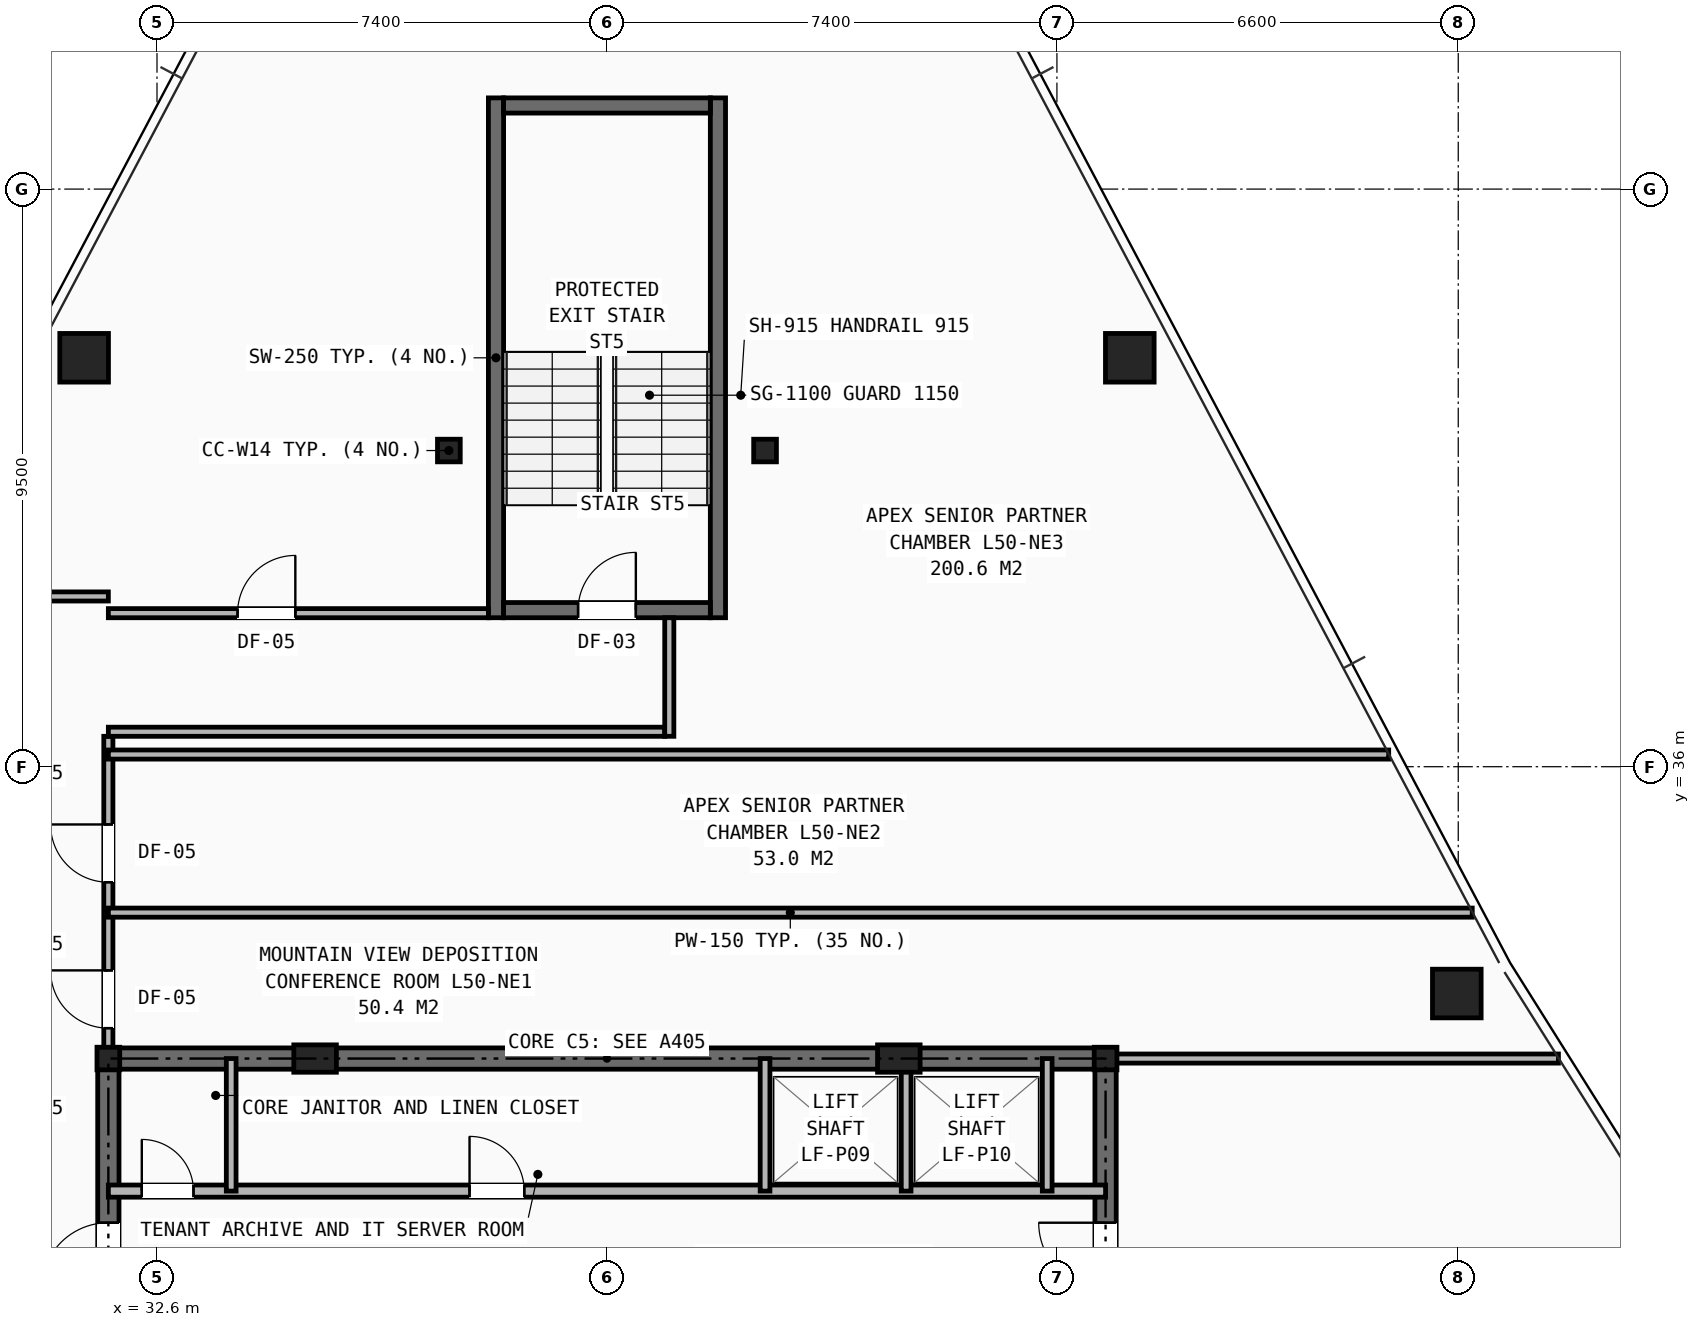
"""IFC4 building model, lengths in metres.
Left out: names, types, materials, properties, quantities, classifications, styles, units other than length and angle.
Written with IfcOpenShell. Run it as: python <this file> out.ifc"""

import sys

from ifc_helpers import new_model, si_unit, direction, frame, frame_2d, origin, origin_2d, place, context, subcontext, project, spatial, rectangle, hollow_rectangle, i_section, extrude, element, fill, save


model = new_model("IFC4")
c1 = context("Model", 3, precision=1e-05, world=origin(), true_north=direction((0.0, 1.0)))
c2 = subcontext(c1, "Body", "Model", "MODEL_VIEW")
j1 = project(units=[si_unit("LENGTHUNIT", "METRE"), si_unit("PLANEANGLEUNIT", "RADIAN")], contexts=[c1])
p1 = place(None, origin())
s1 = spatial("IfcSite", under=j1, at=p1, CompositionType="ELEMENT")
p2 = place(p1, origin())
s2 = spatial("IfcBuilding", under=s1, at=p2, CompositionType="ELEMENT")
p3 = place(p2, frame((0.0, 0.0, 175.8)))
s3 = spatial("IfcBuildingStorey", under=s2, at=p3, CompositionType="ELEMENT", Elevation=175.8)
for number, where, z_axis, x_axis in (
    (1, (31.8, 31.2, 0.0), (0.0, 0.0, 1.0), (1.0, 0.0, 0.0)),
    (2, (48.2, 31.2, 0.0), (0.0, 0.0, 1.0), (1.0, 0.0, 0.0)),
    (3, (37.4, 41.2, 0.0), (0.0, 0.0, 1.0), (1.0, 0.0, 0.0)),
    (4, (42.6, 41.2, 0.0), (0.0, 0.0, 1.0), (1.0, 0.0, 0.0)),
):
    element("IfcColumn", number, at=place(p3, frame(where, z_axis=z_axis, x_axis=x_axis)), inside=s3, PredefinedType="COLUMN", context=c2, shape_type="SweptSolid", body=[
        extrude(i_section(OverallWidth=0.374, OverallDepth=0.372, WebThickness=0.016, FlangeThickness=0.026, at=origin_2d()), origin(), (0.0, 0.0, 1.0), 3.45),
    ])
for number, where, z_axis, x_axis in (
    (5, (35.2, 31.2, 0.0), (0.0, 0.0, 1.0), (1.0, 0.0, 0.0)),
    (6, (44.8, 31.2, 0.0), (0.0, 0.0, 1.0), (1.0, 0.0, 0.0)),
):
    element("IfcColumn", number, at=place(p3, frame(where, z_axis=z_axis, x_axis=x_axis)), inside=s3, PredefinedType="PILASTER", context=c2, shape_type="SweptSolid", body=[
        extrude(rectangle(XDim=0.7, YDim=0.45, at=origin_2d()), origin(), (0.0, 0.0, 1.0), 3.45),
    ])
for number, where, z_axis, x_axis in (
    (7, (31.402, 42.726, 0.0), (0.0, 0.0, 1.0), (1.0, 0.0, 0.0)),
    (8, (53.976, 32.269, 0.0), (0.0, 0.0, 1.0), (1.0, 0.0, 0.0)),
    (9, (48.598, 42.726, 0.0), (0.0, 0.0, 1.0), (1.0, 0.0, 0.0)),
):
    element("IfcColumn", number, at=place(p3, frame(where, z_axis=z_axis, x_axis=x_axis)), inside=s3, PredefinedType="COLUMN", context=c2, shape_type="SweptSolid", body=[
        extrude(hollow_rectangle(XDim=0.8, YDim=0.8, WallThickness=0.055, at=origin_2d()), origin(), (0.0, 0.0, 1.0), 3.45),
    ])
p4 = place(p3, frame((31.8, 31.2, 0.0), z_axis=(0.0, 0.0, 1.0), x_axis=(1.0, 0.0, 0.0)))
e10 = element("IfcWall", 10, at=p4, inside=s3, PredefinedType="SHEAR", context=c2, shape_type="SweptSolid", body=[
    extrude(rectangle(XDim=16.4, YDim=0.35, at=frame_2d((8.2, 0.0))), origin(), (0.0, 0.0, 1.0), 3.21),
])
p5 = place(p3, frame((31.8, 16.4, 0.0), z_axis=(0.0, 0.0, 1.0), x_axis=(0.0, 1.0, 0.0)))
e11 = element("IfcWall", 11, at=p5, inside=s3, PredefinedType="SHEAR", context=c2, shape_type="SweptSolid", body=[
    extrude(rectangle(XDim=14.8, YDim=0.35, at=frame_2d((7.4, 0.0))), origin(), (0.0, 0.0, 1.0), 3.21),
])
p6 = place(p5, frame((11.0, 0.0, 0.0)))
e12 = element("IfcOpeningElement", 12, at=p6, cuts=e11, PredefinedType="OPENING", context=c2, shape_type="SweptSolid", body=[
    extrude(rectangle(XDim=1.1, YDim=2.15, at=frame_2d((0.55, 1.075))), frame((0.0, 0.185, 0.0), z_axis=(0.0, -1.0, 0.0), x_axis=(1.0, 0.0, 0.0)), (0.0, 0.0, 1.0), 0.37),
])
p7 = place(p3, frame((48.2, 16.4, 0.0), z_axis=(0.0, 0.0, 1.0), x_axis=(0.0, 1.0, 0.0)))
e13 = element("IfcWall", 13, at=p7, inside=s3, PredefinedType="SHEAR", context=c2, shape_type="SweptSolid", body=[
    extrude(rectangle(XDim=14.8, YDim=0.35, at=frame_2d((7.4, 0.0))), origin(), (0.0, 0.0, 1.0), 3.21),
])
p8 = place(p7, frame((11.0, 0.0, 0.0)))
e14 = element("IfcOpeningElement", 14, at=p8, cuts=e13, PredefinedType="OPENING", context=c2, shape_type="SweptSolid", body=[
    extrude(rectangle(XDim=1.1, YDim=2.15, at=frame_2d((0.55, 1.075))), frame((0.0, 0.185, 0.0), z_axis=(0.0, -1.0, 0.0), x_axis=(1.0, 0.0, 0.0)), (0.0, 0.0, 1.0), 0.37),
])
p9 = place(p3, frame((31.8, 29.02, 0.0), z_axis=(0.0, 0.0, 1.0), x_axis=(1.0, 0.0, 0.0)))
e15 = element("IfcWall", 15, at=p9, inside=s3, PredefinedType="SOLIDWALL", context=c2, shape_type="SweptSolid", body=[
    extrude(rectangle(XDim=16.4, YDim=0.2, at=frame_2d((8.2, 0.0))), origin(), (0.0, 0.0, 1.0), 2.665),
])
p10 = place(p9, frame((0.55, 0.0, 0.0)))
e16 = element("IfcOpeningElement", 16, at=p10, cuts=e15, PredefinedType="OPENING", context=c2, shape_type="SweptSolid", body=[
    extrude(rectangle(XDim=0.85, YDim=2.05, at=frame_2d((0.425, 1.025))), frame((0.0, 0.11, 0.0), z_axis=(0.0, -1.0, 0.0), x_axis=(1.0, 0.0, 0.0)), (0.0, 0.0, 1.0), 0.22),
])
p11 = place(p9, frame((5.94, 0.0, 0.0)))
e17 = element("IfcOpeningElement", 17, at=p11, cuts=e15, PredefinedType="OPENING", context=c2, shape_type="SweptSolid", body=[
    extrude(rectangle(XDim=0.9, YDim=2.1, at=frame_2d((0.45, 1.05))), frame((0.0, 0.11, 0.0), z_axis=(0.0, -1.0, 0.0), x_axis=(1.0, 0.0, 0.0)), (0.0, 0.0, 1.0), 0.22),
])
for number, where, z_axis, x_axis in (
    (18, (33.82, 29.02, 0.0), (0.0, 0.0, 1.0), (0.0, 1.0, 0.0)),
    (19, (42.6, 29.02, 0.0), (0.0, 0.0, 1.0), (0.0, 1.0, 0.0)),
    (20, (44.92, 29.02, 0.0), (0.0, 0.0, 1.0), (0.0, 1.0, 0.0)),
    (21, (47.24, 29.02, 0.0), (0.0, 0.0, 1.0), (0.0, 1.0, 0.0)),
):
    element("IfcWall", number, at=place(p3, frame(where, z_axis=z_axis, x_axis=x_axis)), inside=s3, PredefinedType="SOLIDWALL", context=c2, shape_type="SweptSolid", body=[
        extrude(rectangle(XDim=2.18, YDim=0.16, at=frame_2d((1.09, 0.0))), origin(), (0.0, 0.0, 1.0), 2.938),
    ])
p12 = place(p3, frame((31.8, 31.2, 0.0), z_axis=(0.0, 0.0, 1.0), x_axis=(0.0, 1.0, 0.0)))
e22 = element("IfcWall", 22, at=p12, inside=s3, PredefinedType="PARTITIONING", context=c2, shape_type="SweptSolid", body=[
    extrude(rectangle(XDim=5.3, YDim=0.15, at=frame_2d((2.65, 0.0))), origin(), (0.0, 0.0, 1.0), 2.252),
])
p13 = place(p12, frame((0.5, 0.0, 0.0)))
e23 = element("IfcOpeningElement", 23, at=p13, cuts=e22, PredefinedType="OPENING", context=c2, shape_type="SweptSolid", body=[
    extrude(rectangle(XDim=0.95, YDim=2.1, at=frame_2d((0.475, 1.05))), frame((0.0, 0.085, 0.0), z_axis=(0.0, -1.0, 0.0), x_axis=(1.0, 0.0, 0.0)), (0.0, 0.0, 1.0), 0.17),
])
p14 = place(p12, frame((2.9, 0.0, 0.0)))
e24 = element("IfcOpeningElement", 24, at=p14, cuts=e22, PredefinedType="OPENING", context=c2, shape_type="SweptSolid", body=[
    extrude(rectangle(XDim=0.95, YDim=2.1, at=frame_2d((0.475, 1.05))), frame((0.0, 0.085, 0.0), z_axis=(0.0, -1.0, 0.0), x_axis=(1.0, 0.0, 0.0)), (0.0, 0.0, 1.0), 0.17),
])
p15 = place(p3, frame((29.6, 38.8, 0.0), z_axis=(0.0, 0.0, 1.0), x_axis=(1.0, 0.0, 0.0)))
e25 = element("IfcWall", 25, at=p15, inside=s3, PredefinedType="PARTITIONING", context=c2, shape_type="SweptSolid", body=[
    extrude(rectangle(XDim=2.2, YDim=0.15, at=frame_2d((1.1, 0.0))), origin(), (0.0, 0.0, 1.0), 2.589),
])
p16 = place(p3, frame((48.2, 31.2, 0.0), z_axis=(0.0, 0.0, 1.0), x_axis=(1.0, 0.0, 0.0)))
e26 = element("IfcWall", 26, at=p16, inside=s3, PredefinedType="PARTITIONING", context=c2, shape_type="SweptSolid", body=[
    extrude(rectangle(XDim=7.448, YDim=0.15, at=frame_2d((3.724, 0.0))), origin(), (0.0, 0.0, 1.0), 2.252),
])
p17 = place(p3, frame((31.8, 33.6, 0.0), z_axis=(0.0, 0.0, 1.0), x_axis=(1.0, 0.0, 0.0)))
e27 = element("IfcWall", 27, at=p17, inside=s3, PredefinedType="PARTITIONING", context=c2, shape_type="SweptSolid", body=[
    extrude(rectangle(XDim=22.43, YDim=0.15, at=frame_2d((11.215, 0.0))), origin(), (0.0, 0.0, 1.0), 2.589),
])
p18 = place(p3, frame((31.8, 36.2, 0.0), z_axis=(0.0, 0.0, 1.0), x_axis=(1.0, 0.0, 0.0)))
e28 = element("IfcWall", 28, at=p18, inside=s3, PredefinedType="PARTITIONING", context=c2, shape_type="SweptSolid", body=[
    extrude(rectangle(XDim=21.056, YDim=0.15, at=frame_2d((10.528, 0.0))), origin(), (0.0, 0.0, 1.0), 2.589),
])
for number, where, z_axis, x_axis in (
    (29, (38.175, 38.45, 0.0), (0.0, 0.0, 1.0), (0.0, 1.0, 0.0)),
    (30, (41.825, 38.45, 0.0), (0.0, 0.0, 1.0), (0.0, 1.0, 0.0)),
):
    element("IfcWall", number, at=place(p3, frame(where, z_axis=z_axis, x_axis=x_axis)), inside=s3, PredefinedType="SHEAR", context=c2, shape_type="SweptSolid", body=[
        extrude(rectangle(XDim=8.55, YDim=0.25, at=frame_2d((4.275, 0.0))), origin(), (0.0, 0.0, 1.0), 3.21),
    ])
p19 = place(p3, frame((38.3, 38.575, 0.0), z_axis=(0.0, 0.0, 1.0), x_axis=(1.0, 0.0, 0.0)))
e31 = element("IfcWall", 31, at=p19, inside=s3, PredefinedType="SHEAR", context=c2, shape_type="SweptSolid", body=[
    extrude(rectangle(XDim=3.4, YDim=0.25, at=frame_2d((1.7, 0.0))), origin(), (0.0, 0.0, 1.0), 3.21),
])
p20 = place(p19, frame((1.225, 0.0, 0.0)))
e32 = element("IfcOpeningElement", 32, at=p20, cuts=e31, PredefinedType="OPENING", context=c2, shape_type="SweptSolid", body=[
    extrude(rectangle(XDim=0.95, YDim=2.1, at=frame_2d((0.475, 1.05))), frame((0.0, 0.135, 0.0), z_axis=(0.0, -1.0, 0.0), x_axis=(1.0, 0.0, 0.0)), (0.0, 0.0, 1.0), 0.27),
])
p21 = place(p3, frame((38.3, 46.875, 0.0), z_axis=(0.0, 0.0, 1.0), x_axis=(1.0, 0.0, 0.0)))
e33 = element("IfcWall", 33, at=p21, inside=s3, PredefinedType="SHEAR", context=c2, shape_type="SweptSolid", body=[
    extrude(rectangle(XDim=3.4, YDim=0.25, at=frame_2d((1.7, 0.0))), origin(), (0.0, 0.0, 1.0), 3.21),
])
p22 = place(p3, frame((31.8, 36.575, 0.0), z_axis=(0.0, 0.0, 1.0), x_axis=(1.0, 0.0, 0.0)))
e34 = element("IfcWall", 34, at=p22, inside=s3, PredefinedType="PARTITIONING", context=c2, shape_type="SweptSolid", body=[
    extrude(rectangle(XDim=9.15, YDim=0.15, at=frame_2d((4.575, 0.0))), origin(), (0.0, 0.0, 1.0), 3.21),
])
p23 = place(p3, frame((31.8, 38.525, 0.0), z_axis=(0.0, 0.0, 1.0), x_axis=(1.0, 0.0, 0.0)))
e35 = element("IfcWall", 35, at=p23, inside=s3, PredefinedType="PARTITIONING", context=c2, shape_type="SweptSolid", body=[
    extrude(rectangle(XDim=6.25, YDim=0.15, at=frame_2d((3.125, 0.0))), origin(), (0.0, 0.0, 1.0), 2.793),
])
p24 = place(p23, frame((2.125, 0.0, 0.0)))
e36 = element("IfcOpeningElement", 36, at=p24, cuts=e35, PredefinedType="OPENING", context=c2, shape_type="SweptSolid", body=[
    extrude(rectangle(XDim=0.95, YDim=2.1, at=frame_2d((0.475, 1.05))), frame((0.0, 0.085, 0.0), z_axis=(0.0, -1.0, 0.0), x_axis=(1.0, 0.0, 0.0)), (0.0, 0.0, 1.0), 0.17),
])
p25 = place(p3, frame((41.025, 36.5, 0.0), z_axis=(0.0, 0.0, 1.0), x_axis=(0.0, 1.0, 0.0)))
e37 = element("IfcWall", 37, at=p25, inside=s3, PredefinedType="PARTITIONING", context=c2, shape_type="SweptSolid", body=[
    extrude(rectangle(XDim=1.95, YDim=0.15, at=frame_2d((0.975, 0.0))), origin(), (0.0, 0.0, 1.0), 3.21),
])
p26 = place(p10, origin())
e38 = element("IfcDoor", 38, at=p26, inside=s3, OperationType="SINGLE_SWING_LEFT", PredefinedType="DOOR", context=c2, shape_type="SweptSolid", body=[
    extrude(rectangle(XDim=0.85, YDim=2.05, at=frame_2d((0.425, 1.025))), frame((0.0, 0.025, 0.0), z_axis=(0.0, -1.0, 0.0), x_axis=(1.0, 0.0, 0.0)), (0.0, 0.0, 1.0), 0.05),
])
fill(e16, e38)
p27 = place(p6, origin())
e39 = element("IfcDoor", 39, at=p27, inside=s3, OperationType="SINGLE_SWING_LEFT", PredefinedType="DOOR", context=c2, shape_type="SweptSolid", body=[
    extrude(rectangle(XDim=1.1, YDim=2.15, at=frame_2d((0.55, 1.075))), frame((0.0, 0.025, 0.0), z_axis=(0.0, -1.0, 0.0), x_axis=(1.0, 0.0, 0.0)), (0.0, 0.0, 1.0), 0.05),
])
fill(e12, e39)
p28 = place(p8, origin())
e40 = element("IfcDoor", 40, at=p28, inside=s3, OperationType="SINGLE_SWING_RIGHT", PredefinedType="DOOR", context=c2, shape_type="SweptSolid", body=[
    extrude(rectangle(XDim=1.1, YDim=2.15, at=frame_2d((0.55, 1.075))), frame((0.0, 0.025, 0.0), z_axis=(0.0, -1.0, 0.0), x_axis=(1.0, 0.0, 0.0)), (0.0, 0.0, 1.0), 0.05),
])
fill(e14, e40)
p29 = place(p11, origin())
e41 = element("IfcDoor", 41, at=p29, inside=s3, OperationType="SINGLE_SWING_LEFT", PredefinedType="DOOR", context=c2, shape_type="SweptSolid", body=[
    extrude(rectangle(XDim=0.9, YDim=2.1, at=frame_2d((0.45, 1.05))), frame((0.0, 0.025, 0.0), z_axis=(0.0, -1.0, 0.0), x_axis=(1.0, 0.0, 0.0)), (0.0, 0.0, 1.0), 0.05),
])
fill(e17, e41)
p30 = place(p13, origin())
e42 = element("IfcDoor", 42, at=p30, inside=s3, OperationType="SINGLE_SWING_RIGHT", PredefinedType="DOOR", context=c2, shape_type="SweptSolid", body=[
    extrude(rectangle(XDim=0.95, YDim=2.1, at=frame_2d((0.475, 1.05))), frame((0.0, 0.025, 0.0), z_axis=(0.0, -1.0, 0.0), x_axis=(1.0, 0.0, 0.0)), (0.0, 0.0, 1.0), 0.05),
])
fill(e23, e42)
p31 = place(p14, origin())
e43 = element("IfcDoor", 43, at=p31, inside=s3, OperationType="SINGLE_SWING_RIGHT", PredefinedType="DOOR", context=c2, shape_type="SweptSolid", body=[
    extrude(rectangle(XDim=0.95, YDim=2.1, at=frame_2d((0.475, 1.05))), frame((0.0, 0.025, 0.0), z_axis=(0.0, -1.0, 0.0), x_axis=(1.0, 0.0, 0.0)), (0.0, 0.0, 1.0), 0.05),
])
fill(e24, e43)
p32 = place(p24, origin())
e44 = element("IfcDoor", 44, at=p32, inside=s3, OperationType="SINGLE_SWING_RIGHT", PredefinedType="DOOR", context=c2, shape_type="SweptSolid", body=[
    extrude(rectangle(XDim=0.95, YDim=2.1, at=frame_2d((0.475, 1.05))), frame((0.0, 0.025, 0.0), z_axis=(0.0, -1.0, 0.0), x_axis=(1.0, 0.0, 0.0)), (0.0, 0.0, 1.0), 0.05),
])
fill(e36, e44)
p33 = place(p20, origin())
e45 = element("IfcDoor", 45, at=p33, inside=s3, OperationType="SINGLE_SWING_RIGHT", PredefinedType="DOOR", context=c2, shape_type="SweptSolid", body=[
    extrude(rectangle(XDim=0.95, YDim=2.1, at=frame_2d((0.475, 1.05))), frame((0.0, 0.025, 0.0), z_axis=(0.0, -1.0, 0.0), x_axis=(1.0, 0.0, 0.0)), (0.0, 0.0, 1.0), 0.05),
])
fill(e32, e45)
save(model, sys.argv[1])
